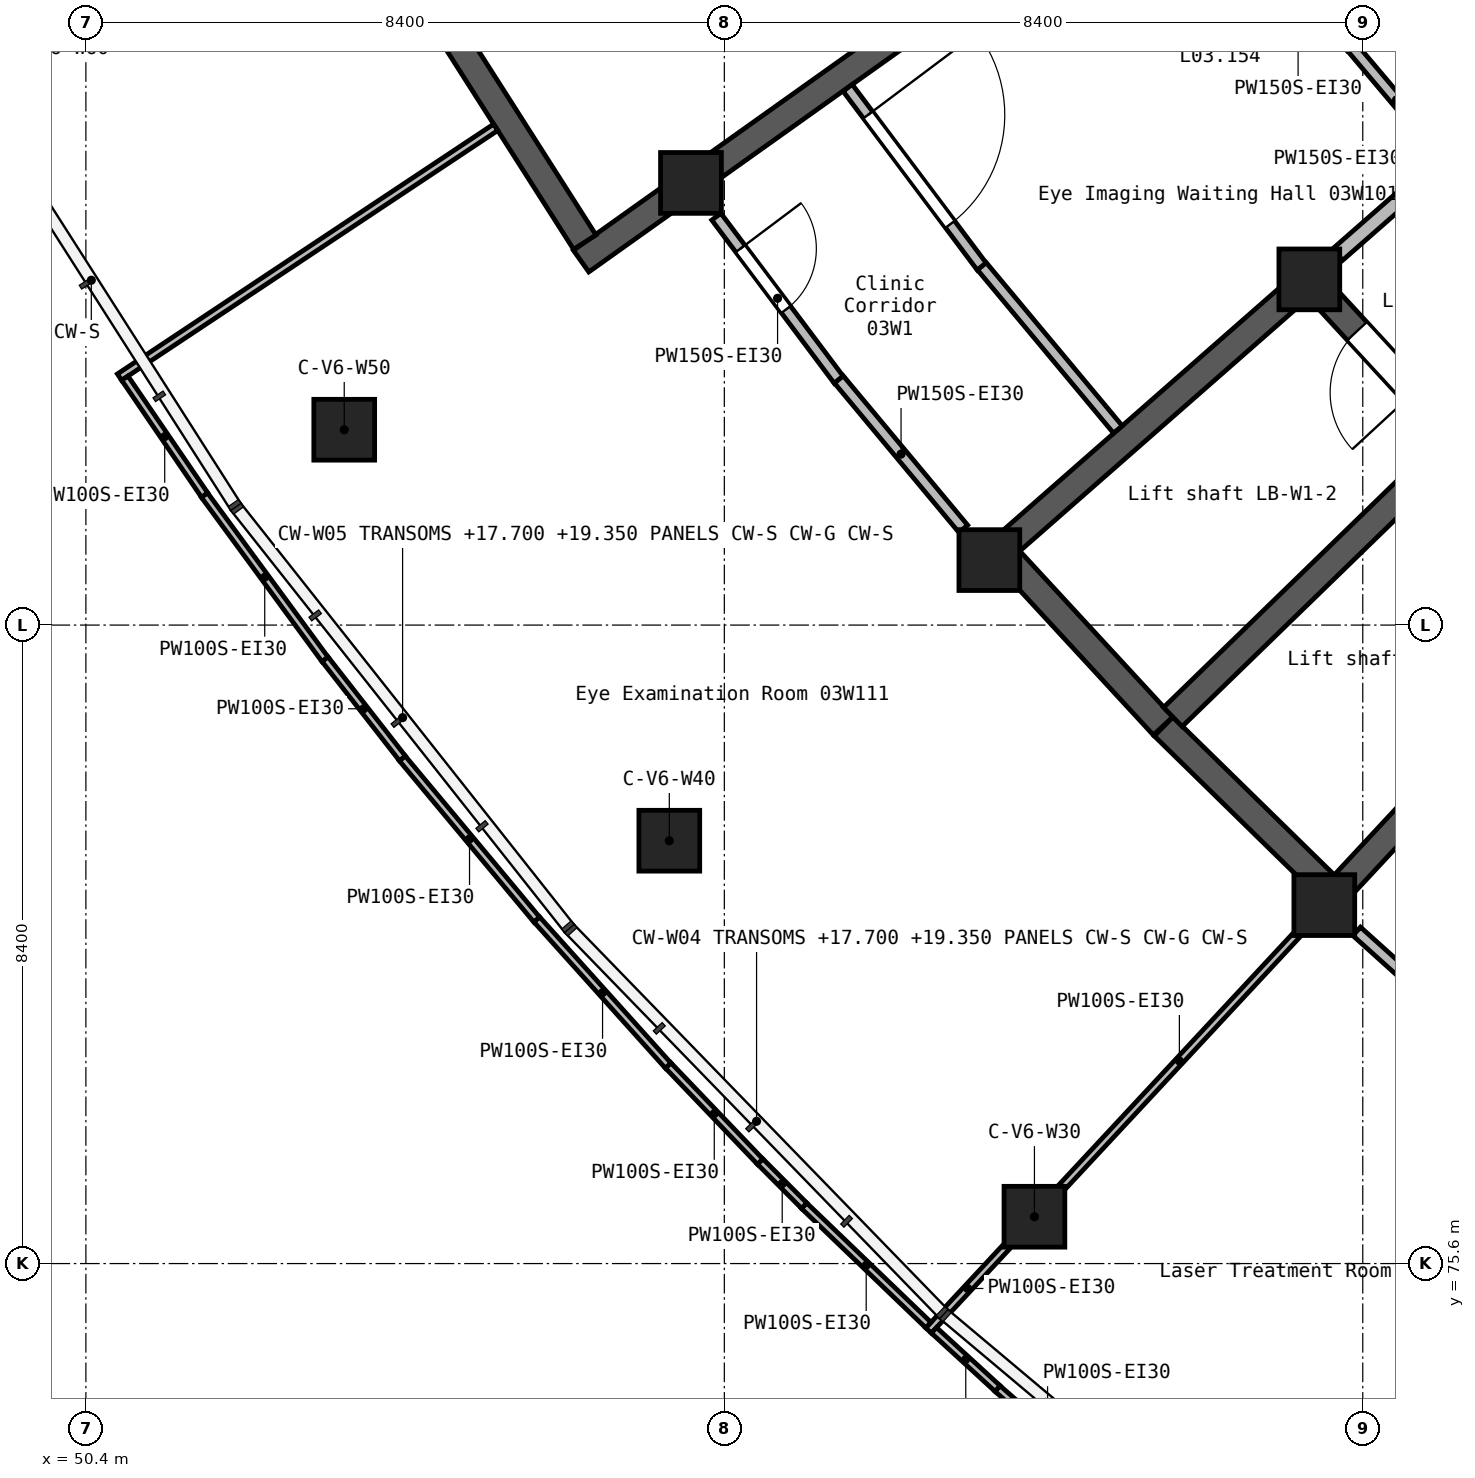
"""IFC4 building model, lengths in metres.
Left out: names, types, materials, properties, quantities, classifications, styles, units other than length and angle.
Written with IfcOpenShell. Run it as: python <this file> out.ifc"""

import sys

from ifc_helpers import new_model, si_unit, direction, frame, frame_2d, origin, origin_2d, place, context, subcontext, project, spatial, rectangle, extrude, element, fill, save


model = new_model("IFC4")
c1 = context("Model", 3, precision=1e-05, world=origin(), true_north=direction((0.0, 1.0)))
c2 = subcontext(c1, "Body", "Model", "MODEL_VIEW")
j1 = project(units=[si_unit("LENGTHUNIT", "METRE"), si_unit("PLANEANGLEUNIT", "RADIAN")], contexts=[c1])
p1 = place(None, origin())
s1 = spatial("IfcSite", under=j1, at=p1, CompositionType="ELEMENT")
p2 = place(p1, origin())
s2 = spatial("IfcBuilding", under=s1, at=p2, CompositionType="ELEMENT")
p3 = place(p2, frame((0.0, 0.0, 16.8)))
s3 = spatial("IfcBuildingStorey", under=s2, at=p3, CompositionType="ELEMENT", Elevation=16.8)
for number, where, z_axis, x_axis in (
    (1, (53.799, 86.57, 0.0), (0.0, 0.0, 1.0), (1.0, 0.0, 0.0)),
    (2, (58.076, 81.163, 0.0), (0.0, 0.0, 1.0), (1.0, 0.0, 0.0)),
    (3, (58.361, 89.817, 0.0), (0.0, 0.0, 1.0), (1.0, 0.0, 0.0)),
    (4, (62.287, 84.855, 0.0), (0.0, 0.0, 1.0), (1.0, 0.0, 0.0)),
    (5, (62.88, 76.216, 0.0), (0.0, 0.0, 1.0), (1.0, 0.0, 0.0)),
    (6, (66.497, 88.548, 0.0), (0.0, 0.0, 1.0), (1.0, 0.0, 0.0)),
    (7, (66.694, 80.316, 0.0), (0.0, 0.0, 1.0), (1.0, 0.0, 0.0)),
):
    element("IfcColumn", number, at=place(p3, frame(where, z_axis=z_axis, x_axis=x_axis)), inside=s3, PredefinedType="COLUMN", context=c2, shape_type="SweptSolid", body=[
        extrude(rectangle(XDim=0.8, YDim=0.8, at=origin_2d()), origin(), (0.0, 0.0, 1.0), 4.2),
    ])
p4 = place(p3, frame((56.916, 88.789, 0.0), z_axis=(0.0, 0.0, 1.0), x_axis=(0.814717690591, 0.579857814157, 0.0)))
e8 = element("IfcWall", 8, at=p4, inside=s3, PredefinedType="SHEAR", context=c2, shape_type="SweptSolid", body=[
    extrude(rectangle(XDim=7.55, YDim=0.35, at=frame_2d((3.775, 0.0))), origin(), (0.0, 0.0, 1.0), 4.2),
])
p5 = place(p3, frame((56.964, 89.038, 0.0), z_axis=(0.0, 0.0, 1.0), x_axis=(-0.537811796172, 0.843064927451, 0.0)))
e9 = element("IfcWall", 9, at=p5, inside=s3, PredefinedType="SHEAR", context=c2, shape_type="SweptSolid", body=[
    extrude(rectangle(XDim=6.139, YDim=0.35, at=frame_2d((3.07, 0.0))), origin(), (0.0, 0.0, 1.0), 4.2),
])
p6 = place(p3, frame((62.305, 84.872, 0.0), z_axis=(0.0, 0.0, 1.0), x_axis=(0.751808220443, 0.659381831471, 0.0)))
e10 = element("IfcWall", 10, at=p6, inside=s3, PredefinedType="SHEAR", context=c2, shape_type="SweptSolid", body=[
    extrude(rectangle(XDim=5.75, YDim=0.35, at=frame_2d((2.875, 0.0))), origin(), (0.0, 0.0, 1.0), 4.2),
])
p7 = place(p3, frame((62.556, 84.858, 0.0), z_axis=(0.0, 0.0, 1.0), x_axis=(0.67818124014, -0.73489469009, 0.0)))
e11 = element("IfcWall", 11, at=p7, inside=s3, PredefinedType="SHEAR", context=c2, shape_type="SweptSolid", body=[
    extrude(rectangle(XDim=2.975, YDim=0.35, at=frame_2d((1.487, 0.0))), origin(), (0.0, 0.0, 1.0), 4.2),
])
p8 = place(p3, frame((64.579, 82.666, 0.0), z_axis=(0.0, 0.0, 1.0), x_axis=(0.714695816666, -0.699435407769, 0.0)))
e12 = element("IfcWall", 12, at=p8, inside=s3, PredefinedType="SHEAR", context=c2, shape_type="SweptSolid", body=[
    extrude(rectangle(XDim=2.976, YDim=0.35, at=frame_2d((1.488, 0.0))), origin(), (0.0, 0.0, 1.0), 4.2),
])
p9 = place(p3, frame((64.702, 82.791, 0.0), z_axis=(0.0, 0.0, 1.0), x_axis=(0.717400873641, 0.696660596345, 0.0)))
e13 = element("IfcWall", 13, at=p9, inside=s3, PredefinedType="SHEAR", context=c2, shape_type="SweptSolid", body=[
    extrude(rectangle(XDim=5.05, YDim=0.35, at=frame_2d((2.525, 0.0))), origin(), (0.0, 0.0, 1.0), 4.2),
])
p10 = place(p3, frame((66.712, 80.334, 0.0), z_axis=(0.0, 0.0, 1.0), x_axis=(0.681084356202, 0.732204957465, 0.0)))
e14 = element("IfcWall", 14, at=p10, inside=s3, PredefinedType="SHEAR", context=c2, shape_type="SweptSolid", body=[
    extrude(rectangle(XDim=5.75, YDim=0.35, at=frame_2d((2.875, 0.0))), origin(), (0.0, 0.0, 1.0), 4.2),
])
p11 = place(p3, frame((68.447, 86.434, 0.0), z_axis=(0.0, 0.0, 1.0), x_axis=(-0.678058558992, 0.735007884704, 0.0)))
e15 = element("IfcWall", 15, at=p11, inside=s3, PredefinedType="SHEAR", context=c2, shape_type="SweptSolid", body=[
    extrude(rectangle(XDim=2.701, YDim=0.35, at=frame_2d((1.35, 0.0))), origin(), (0.0, 0.0, 1.0), 4.2),
])
p12 = place(p11, frame((0.85, 0.0, 0.0)))
e16 = element("IfcOpeningElement", 16, at=p12, cuts=e15, PredefinedType="OPENING", context=c2, shape_type="SweptSolid", body=[
    extrude(rectangle(XDim=1.1, YDim=2.1, at=frame_2d((0.55, 1.05))), frame((0.0, 0.185, 0.0), z_axis=(0.0, -1.0, 0.0), x_axis=(1.0, 0.0, 0.0)), (0.0, 0.0, 1.0), 0.37),
])
p13 = place(p3, frame((66.869, 88.874, 0.0), z_axis=(0.0, 0.0, 1.0), x_axis=(0.751874567132, 0.659306177205, 0.0)))
e17 = element("IfcWall", 17, at=p13, inside=s3, PredefinedType="SOLIDWALL", context=c2, shape_type="SweptSolid", body=[
    extrude(rectangle(XDim=2.004, YDim=0.2, at=frame_2d((1.002, 0.0))), origin(), (0.0, 0.0, 1.0), 3.9),
])
p14 = place(p3, frame((58.695, 89.373, 0.0), z_axis=(0.0, 0.0, 1.0), x_axis=(0.600189191088, -0.799858071724, 0.0)))
e18 = element("IfcWall", 18, at=p14, inside=s3, PredefinedType="PARTITIONING", context=c2, shape_type="SweptSolid", body=[
    extrude(rectangle(XDim=2.684, YDim=0.15, at=frame_2d((1.342, 0.0))), origin(), (0.0, 0.0, 1.0), 3.9),
])
p15 = place(p14, frame((0.526, 0.0, 0.0)))
e19 = element("IfcOpeningElement", 19, at=p15, cuts=e18, PredefinedType="OPENING", context=c2, shape_type="SweptSolid", body=[
    extrude(rectangle(XDim=1.0, YDim=2.1, at=frame_2d((0.5, 1.05))), frame((0.0, 0.085, 0.0), z_axis=(0.0, -1.0, 0.0), x_axis=(1.0, 0.0, 0.0)), (0.0, 0.0, 1.0), 0.17),
])
p16 = place(p3, frame((60.307, 87.231, 0.0), z_axis=(0.0, 0.0, 1.0), x_axis=(0.64023135863, -0.768182144694, 0.0)))
e20 = element("IfcWall", 20, at=p16, inside=s3, PredefinedType="PARTITIONING", context=c2, shape_type="SweptSolid", body=[
    extrude(rectangle(XDim=2.557, YDim=0.15, at=frame_2d((1.278, 0.0))), origin(), (0.0, 0.0, 1.0), 3.9),
])
p17 = place(p3, frame((67.12, 79.971, 0.0), z_axis=(0.0, 0.0, 1.0), x_axis=(0.743284610851, -0.668975326355, 0.0)))
e21 = element("IfcWall", 21, at=p17, inside=s3, PredefinedType="PARTITIONING", context=c2, shape_type="SweptSolid", body=[
    extrude(rectangle(XDim=2.546, YDim=0.15, at=frame_2d((1.273, 0.0))), origin(), (0.0, 0.0, 1.0), 3.9),
])
p18 = place(p3, frame((60.423, 91.068, 0.0), z_axis=(0.0, 0.0, 1.0), x_axis=(0.600119519183, -0.799910346661, 0.0)))
e22 = element("IfcWall", 22, at=p18, inside=s3, PredefinedType="PARTITIONING", context=c2, shape_type="SweptSolid", body=[
    extrude(rectangle(XDim=2.941, YDim=0.15, at=frame_2d((1.471, 0.0))), origin(), (0.0, 0.0, 1.0), 3.9),
])
p19 = place(p18, frame((0.445, 0.0, 0.0)))
e23 = element("IfcOpeningElement", 23, at=p19, cuts=e22, PredefinedType="OPENING", context=c2, shape_type="SweptSolid", body=[
    extrude(rectangle(XDim=1.8, YDim=2.1, at=frame_2d((0.9, 1.05))), frame((0.0, 0.085, 0.0), z_axis=(0.0, -1.0, 0.0), x_axis=(1.0, 0.0, 0.0)), (0.0, 0.0, 1.0), 0.17),
])
p20 = place(p3, frame((62.189, 88.72, 0.0), z_axis=(0.0, 0.0, 1.0), x_axis=(0.640253147886, -0.7681639842, 0.0)))
e24 = element("IfcWall", 24, at=p20, inside=s3, PredefinedType="PARTITIONING", context=c2, shape_type="SweptSolid", body=[
    extrude(rectangle(XDim=2.794, YDim=0.15, at=frame_2d((1.397, 0.0))), origin(), (0.0, 0.0, 1.0), 3.9),
])
p21 = place(p3, frame((67.052, 91.609, 0.0), z_axis=(0.0, 0.0, 1.0), x_axis=(0.645369063346, -0.763870913228, 0.0)))
e25 = element("IfcWall", 25, at=p21, inside=s3, PredefinedType="PARTITIONING", context=c2, shape_type="SweptSolid", body=[
    extrude(rectangle(XDim=1.833, YDim=0.15, at=frame_2d((0.917, 0.0))), origin(), (0.0, 0.0, 1.0), 3.9),
])
p22 = place(p3, frame((61.487, 74.719, 0.0), z_axis=(0.0, 0.0, 1.0), x_axis=(0.681355821593, 0.731952351168, 0.0)))
e26 = element("IfcWall", 26, at=p22, inside=s3, PredefinedType="PARTITIONING", context=c2, shape_type="SweptSolid", body=[
    extrude(rectangle(XDim=1.51, YDim=0.1, at=frame_2d((0.755, 0.0))), origin(), (0.0, 0.0, 1.0), 3.9),
])
p23 = place(p3, frame((63.244, 76.607, 0.0), z_axis=(0.0, 0.0, 1.0), x_axis=(0.681263193371, 0.732038565485, 0.0)))
e27 = element("IfcWall", 27, at=p23, inside=s3, PredefinedType="PARTITIONING", context=c2, shape_type="SweptSolid", body=[
    extrude(rectangle(XDim=4.529, YDim=0.1, at=frame_2d((2.265, 0.0))), origin(), (0.0, 0.0, 1.0), 3.9),
])
p24 = place(p3, frame((50.842, 87.262, 0.0), z_axis=(0.0, 0.0, 1.0), x_axis=(0.833066771492, 0.553172445297, 0.0)))
e28 = element("IfcWall", 28, at=p24, inside=s3, PredefinedType="PARTITIONING", context=c2, shape_type="SweptSolid", body=[
    extrude(rectangle(XDim=5.941, YDim=0.1, at=frame_2d((2.97, 0.0))), origin(), (0.0, 0.0, 1.0), 3.9),
])
p25 = place(p3, frame((54.562, 82.247, 0.0), z_axis=(0.0, 0.0, 1.0), x_axis=(0.640436201221, -0.768011375024, 0.0)))
e29 = element("IfcWall", 29, at=p25, inside=s3, PredefinedType="PARTITIONING", context=c2, shape_type="SweptSolid", body=[
    extrude(rectangle(XDim=2.765, YDim=0.1, at=frame_2d((1.383, 0.0))), origin(), (0.0, 0.0, 1.0), 3.9),
])
p26 = place(p3, frame((56.333, 80.126, 0.0), z_axis=(0.0, 0.0, 1.0), x_axis=(0.66858915831, -0.743631990564, 0.0)))
e30 = element("IfcWall", 30, at=p26, inside=s3, PredefinedType="PARTITIONING", context=c2, shape_type="SweptSolid", body=[
    extrude(rectangle(XDim=2.586, YDim=0.1, at=frame_2d((1.293, 0.0))), origin(), (0.0, 0.0, 1.0), 3.9),
])
p27 = place(p3, frame((51.959, 85.711, 0.0), z_axis=(0.0, 0.0, 1.0), x_axis=(0.591667432582, -0.806182143949, 0.0)))
e31 = element("IfcWall", 31, at=p27, inside=s3, PredefinedType="PARTITIONING", context=c2, shape_type="SweptSolid", body=[
    extrude(rectangle(XDim=2.683, YDim=0.1, at=frame_2d((1.341, 0.0))), origin(), (0.0, 0.0, 1.0), 3.9),
])
p28 = place(p3, frame((59.849, 76.362, 0.0), z_axis=(0.0, 0.0, 1.0), x_axis=(0.721335676567, -0.692585620492, 0.0)))
e32 = element("IfcWall", 32, at=p28, inside=s3, PredefinedType="PARTITIONING", context=c2, shape_type="SweptSolid", body=[
    extrude(rectangle(XDim=2.267, YDim=0.1, at=frame_2d((1.134, 0.0))), origin(), (0.0, 0.0, 1.0), 3.9),
])
p29 = place(p3, frame((50.913, 87.248, 0.0), z_axis=(0.0, 0.0, 1.0), x_axis=(0.563658336128, -0.826008038771, 0.0)))
e33 = element("IfcWall", 33, at=p29, inside=s3, PredefinedType="PARTITIONING", context=c2, shape_type="SweptSolid", body=[
    extrude(rectangle(XDim=1.861, YDim=0.1, at=frame_2d((0.931, 0.0))), origin(), (0.0, 0.0, 1.0), 3.9),
])
p30 = place(p3, frame((62.393, 73.956, 0.0), z_axis=(0.0, 0.0, 1.0), x_axis=(0.75241276557, -0.658691908412, 0.0)))
e34 = element("IfcWall", 34, at=p30, inside=s3, PredefinedType="PARTITIONING", context=c2, shape_type="SweptSolid", body=[
    extrude(rectangle(XDim=1.753, YDim=0.1, at=frame_2d((0.876, 0.0))), origin(), (0.0, 0.0, 1.0), 3.9),
])
p31 = place(p3, frame((53.547, 83.551, 0.0), z_axis=(0.0, 0.0, 1.0), x_axis=(0.615268617412, -0.788317530205, 0.0)))
e35 = element("IfcWall", 35, at=p31, inside=s3, PredefinedType="PARTITIONING", context=c2, shape_type="SweptSolid", body=[
    extrude(rectangle(XDim=1.654, YDim=0.1, at=frame_2d((0.827, 0.0))), origin(), (0.0, 0.0, 1.0), 3.9),
])
p32 = place(p3, frame((58.062, 78.205, 0.0), z_axis=(0.0, 0.0, 1.0), x_axis=(0.691314467962, -0.722554016242, 0.0)))
e36 = element("IfcWall", 36, at=p32, inside=s3, PredefinedType="PARTITIONING", context=c2, shape_type="SweptSolid", body=[
    extrude(rectangle(XDim=1.75, YDim=0.1, at=frame_2d((0.875, 0.0))), origin(), (0.0, 0.0, 1.0), 3.9),
])
p33 = place(p3, frame((61.558, 74.722, 0.0), z_axis=(0.0, 0.0, 1.0), x_axis=(0.737725592981, -0.675100695794, 0.0)))
e37 = element("IfcWall", 37, at=p33, inside=s3, PredefinedType="PARTITIONING", context=c2, shape_type="SweptSolid", body=[
    extrude(rectangle(XDim=1.135, YDim=0.1, at=frame_2d((0.567, 0.0))), origin(), (0.0, 0.0, 1.0), 3.9),
])
p34 = place(p3, frame((59.273, 76.941, 0.0), z_axis=(0.0, 0.0, 1.0), x_axis=(0.705912346609, -0.708299201542, 0.0)))
e38 = element("IfcWall", 38, at=p34, inside=s3, PredefinedType="PARTITIONING", context=c2, shape_type="SweptSolid", body=[
    extrude(rectangle(XDim=0.818, YDim=0.1, at=frame_2d((0.409, 0.0))), origin(), (0.0, 0.0, 1.0), 3.9),
])
p35 = place(p19, frame((1.8, 0.0, 0.0), z_axis=(0.0, 0.0, 1.0), x_axis=(-1.0, 0.0, 0.0)))
e39 = element("IfcDoor", 39, at=p35, inside=s3, OperationType="DOUBLE_DOOR_SINGLE_SWING", PredefinedType="DOOR", context=c2, shape_type="SweptSolid", body=[
    extrude(rectangle(XDim=1.8, YDim=2.1, at=frame_2d((0.9, 1.05))), frame((0.0, 0.025, 0.0), z_axis=(0.0, -1.0, 0.0), x_axis=(1.0, 0.0, 0.0)), (0.0, 0.0, 1.0), 0.05),
])
fill(e23, e39)
p36 = place(p15, frame((1.0, 0.0, 0.0), z_axis=(0.0, 0.0, 1.0), x_axis=(-1.0, 0.0, 0.0)))
e40 = element("IfcDoor", 40, at=p36, inside=s3, OperationType="SINGLE_SWING_RIGHT", PredefinedType="DOOR", context=c2, shape_type="SweptSolid", body=[
    extrude(rectangle(XDim=1.0, YDim=2.1, at=frame_2d((0.5, 1.05))), frame((0.0, 0.025, 0.0), z_axis=(0.0, -1.0, 0.0), x_axis=(1.0, 0.0, 0.0)), (0.0, 0.0, 1.0), 0.05),
])
fill(e19, e40)
p37 = place(p12, origin())
e41 = element("IfcDoor", 41, at=p37, inside=s3, OperationType="DOUBLE_DOOR_SLIDING", PredefinedType="DOOR", context=c2, shape_type="SweptSolid", body=[
    extrude(rectangle(XDim=1.1, YDim=2.1, at=frame_2d((0.55, 1.05))), frame((0.0, 0.025, 0.0), z_axis=(0.0, -1.0, 0.0), x_axis=(1.0, 0.0, 0.0)), (0.0, 0.0, 1.0), 0.05),
])
fill(e16, e41)
save(model, sys.argv[1])
